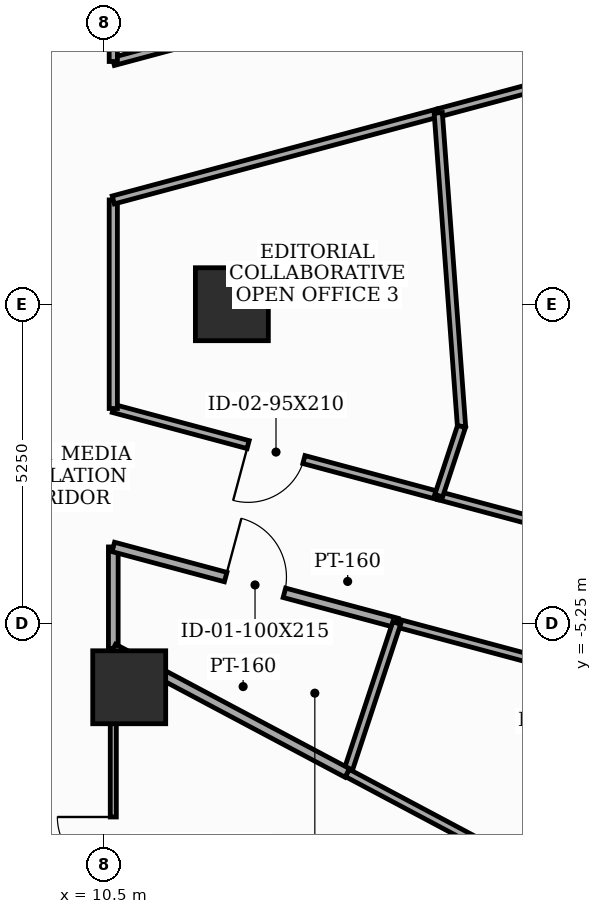
"""IFC4 building model, lengths in metres.
Left out: names, types, materials, properties, quantities, classifications, styles, units other than length and angle.
Written with IfcOpenShell. Run it as: python <this file> out.ifc"""

import sys

from ifc_helpers import new_model, si_unit, direction, frame, frame_2d, origin, origin_2d, place, context, subcontext, project, spatial, rectangle, extrude, element, fill, save


model = new_model("IFC4")
c1 = context("Model", 3, precision=1e-05, world=origin(), true_north=direction((0.0, 1.0)))
c2 = subcontext(c1, "Body", "Model", "MODEL_VIEW")
j1 = project(units=[si_unit("LENGTHUNIT", "METRE"), si_unit("PLANEANGLEUNIT", "RADIAN")], contexts=[c1])
p1 = place(None, origin())
s1 = spatial("IfcSite", under=j1, at=p1, CompositionType="ELEMENT")
p2 = place(p1, origin())
s2 = spatial("IfcBuilding", under=s1, at=p2, CompositionType="ELEMENT")
p3 = place(p2, frame((0.0, 0.0, 112.5)))
s3 = spatial("IfcBuildingStorey", under=s2, at=p3, CompositionType="ELEMENT", Elevation=112.5)
for number, where, z_axis, x_axis in (
    (1, (12.6, 0.0, 0.0), (0.0, 0.0, 1.0), (1.0, 0.0, 0.0)),
    (2, (10.912, -6.3, 0.0), (0.0, 0.0, 1.0), (1.0, 0.0, 0.0)),
):
    element("IfcColumn", number, at=place(p3, frame(where, z_axis=z_axis, x_axis=x_axis)), inside=s3, PredefinedType="COLUMN", context=c2, shape_type="SweptSolid", body=[
        extrude(rectangle(XDim=1.2, YDim=1.2, at=origin_2d()), origin(), (0.0, 0.0, 1.0), 3.7),
    ])
p4 = place(p3, frame((15.46, 5.281, 0.0), z_axis=(0.0, 0.0, 1.0), x_axis=(-0.96591522342, -0.258858612306, 0.0)))
e3 = element("IfcWall", 3, at=p4, inside=s3, PredefinedType="PARTITIONING", context=c2, shape_type="SweptSolid", body=[
    extrude(rectangle(XDim=4.98, YDim=0.135, at=frame_2d((2.49, 0.0))), origin(), (0.0, 0.0, 1.0), 2.785),
])
p5 = place(p3, frame((10.65, 3.992, 0.0), z_axis=(0.0, 0.0, 1.0), x_axis=(0.0, 1.0, 0.0)))
e4 = element("IfcWall", 4, at=p5, inside=s3, PredefinedType="PARTITIONING", context=c2, shape_type="SweptSolid", body=[
    extrude(rectangle(XDim=6.158, YDim=0.135, at=frame_2d((3.079, 0.0))), origin(), (0.0, 0.0, 1.0), 2.785),
])
p6 = place(p3, frame((15.312, -5.242, 0.0), z_axis=(0.0, 0.0, 1.0), x_axis=(0.965923394249, -0.258828121428, 0.0)))
e5 = element("IfcWall", 5, at=p6, inside=s3, PredefinedType="PARTITIONING", context=c2, shape_type="SweptSolid", body=[
    extrude(rectangle(XDim=6.453, YDim=0.135, at=frame_2d((3.227, 0.0))), origin(), (0.0, 0.0, 1.0), 2.935),
])
p7 = place(p6, frame((2.751, 0.0, 0.0)))
e6 = element("IfcOpeningElement", 6, at=p7, cuts=e5, PredefinedType="OPENING", context=c2, shape_type="SweptSolid", body=[
    extrude(rectangle(XDim=0.95, YDim=2.1, at=frame_2d((0.475, 1.05))), frame((0.0, 0.077, 0.0), z_axis=(0.0, -1.0, 0.0), x_axis=(1.0, 0.0, 0.0)), (0.0, 0.0, 1.0), 0.155),
])
p8 = place(p3, frame((22.115, -4.787, 0.0), z_axis=(0.0, 0.0, 1.0), x_axis=(-0.965917916001, 0.258848564894, 0.0)))
e7 = element("IfcWall", 7, at=p8, inside=s3, PredefinedType="PARTITIONING", context=c2, shape_type="SweptSolid", body=[
    extrude(rectangle(XDim=6.329, YDim=0.135, at=frame_2d((3.164, 0.0))), origin(), (0.0, 0.0, 1.0), 2.935),
])
p9 = place(p3, frame((15.994, 3.147, 0.0), z_axis=(0.0, 0.0, 1.0), x_axis=(0.965977255775, 0.258627031314, 0.0)))
e8 = element("IfcWall", 8, at=p9, inside=s3, PredefinedType="PARTITIONING", context=c2, shape_type="SweptSolid", body=[
    extrude(rectangle(XDim=2.536, YDim=0.135, at=frame_2d((1.268, 0.0))), origin(), (0.0, 0.0, 1.0), 3.125),
])
p10 = place(p3, frame((16.002, -3.149, 0.0), z_axis=(0.0, 0.0, 1.0), x_axis=(-0.965936644937, 0.258778665985, 0.0)))
e9 = element("IfcWall", 9, at=p10, inside=s3, PredefinedType="PARTITIONING", context=c2, shape_type="SweptSolid", body=[
    extrude(rectangle(XDim=5.541, YDim=0.135, at=frame_2d((2.771, 0.0))), origin(), (0.0, 0.0, 1.0), 2.785),
])
p11 = place(p10, frame((2.295, 0.0, 0.0)))
e10 = element("IfcOpeningElement", 10, at=p11, cuts=e9, PredefinedType="OPENING", context=c2, shape_type="SweptSolid", body=[
    extrude(rectangle(XDim=0.95, YDim=2.1, at=frame_2d((0.475, 1.05))), frame((0.0, 0.077, 0.0), z_axis=(0.0, -1.0, 0.0), x_axis=(1.0, 0.0, 0.0)), (0.0, 0.0, 1.0), 0.155),
])
p12 = place(p3, frame((10.65, -1.715, 0.0), z_axis=(0.0, 0.0, 1.0), x_axis=(0.0, 1.0, 0.0)))
e11 = element("IfcWall", 11, at=p12, inside=s3, PredefinedType="PARTITIONING", context=c2, shape_type="SweptSolid", body=[
    extrude(rectangle(XDim=3.43, YDim=0.135, at=frame_2d((1.715, 0.0))), origin(), (0.0, 0.0, 1.0), 2.785),
])
p13 = place(p3, frame((10.65, 1.715, 0.0), z_axis=(0.0, 0.0, 1.0), x_axis=(0.965927369368, 0.258813286187, 0.0)))
e12 = element("IfcWall", 12, at=p13, inside=s3, PredefinedType="PARTITIONING", context=c2, shape_type="SweptSolid", body=[
    extrude(rectangle(XDim=5.532, YDim=0.135, at=frame_2d((2.766, 0.0))), origin(), (0.0, 0.0, 1.0), 2.785),
])
p14 = place(p3, frame((10.65, -5.663, 0.0), z_axis=(0.0, 0.0, 1.0), x_axis=(0.0, 1.0, 0.0)))
e13 = element("IfcWall", 13, at=p14, inside=s3, PredefinedType="PARTITIONING", context=c2, shape_type="SweptSolid", body=[
    extrude(rectangle(XDim=1.671, YDim=0.16, at=frame_2d((0.835, 0.0))), origin(), (0.0, 0.0, 1.0), 3.5),
])
p15 = place(p3, frame((10.65, -3.992, 0.0), z_axis=(0.0, 0.0, 1.0), x_axis=(0.965884815894, -0.258972049507, 0.0)))
e14 = element("IfcWall", 14, at=p15, inside=s3, PredefinedType="PARTITIONING", context=c2, shape_type="SweptSolid", body=[
    extrude(rectangle(XDim=4.827, YDim=0.16, at=frame_2d((2.413, 0.0))), origin(), (0.0, 0.0, 1.0), 2.785),
])
p16 = place(p15, frame((1.913, 0.0, 0.0)))
e15 = element("IfcOpeningElement", 15, at=p16, cuts=e14, PredefinedType="OPENING", context=c2, shape_type="SweptSolid", body=[
    extrude(rectangle(XDim=1.0, YDim=2.15, at=frame_2d((0.5, 1.075))), frame((0.0, 0.09, 0.0), z_axis=(0.0, -1.0, 0.0), x_axis=(1.0, 0.0, 0.0)), (0.0, 0.0, 1.0), 0.18),
])
p17 = place(p3, frame((10.65, -10.15, 0.0), z_axis=(0.0, 0.0, 1.0), x_axis=(0.0, 1.0, 0.0)))
e16 = element("IfcWall", 16, at=p17, inside=s3, PredefinedType="MOVABLE", context=c2, shape_type="SweptSolid", body=[
    extrude(rectangle(XDim=4.487, YDim=0.1, at=frame_2d((2.243, 0.0))), origin(), (0.0, 0.0, 1.0), 2.785),
])
p18 = place(p17, frame((0.796, 0.0, 0.0)))
e17 = element("IfcOpeningElement", 17, at=p18, cuts=e16, PredefinedType="OPENING", context=c2, shape_type="SweptSolid", body=[
    extrude(rectangle(XDim=0.92, YDim=2.1, at=frame_2d((0.46, 1.05))), frame((0.0, 0.06, 0.0), z_axis=(0.0, -1.0, 0.0), x_axis=(1.0, 0.0, 0.0)), (0.0, 0.0, 1.0), 0.12),
])
p19 = place(p3, frame((15.994, 3.147, 0.0), z_axis=(0.0, 0.0, 1.0), x_axis=(0.074061203772, -0.99725369796, 0.0)))
e18 = element("IfcWall", 18, at=p19, inside=s3, PredefinedType="PARTITIONING", context=c2, shape_type="SweptSolid", body=[
    extrude(rectangle(XDim=5.172, YDim=0.135, at=frame_2d((2.586, 0.0))), origin(), (0.0, 0.0, 1.0), 2.785),
])
p20 = place(p3, frame((16.377, -2.011, 0.0), z_axis=(0.0, 0.0, 1.0), x_axis=(-0.312986027466, -0.949757730482, 0.0)))
e19 = element("IfcWall", 19, at=p20, inside=s3, PredefinedType="PARTITIONING", context=c2, shape_type="SweptSolid", body=[
    extrude(rectangle(XDim=1.198, YDim=0.135, at=frame_2d((0.599, 0.0))), origin(), (0.0, 0.0, 1.0), 3.5),
])
p21 = place(p3, frame((15.312, -5.242, 0.0), z_axis=(0.0, 0.0, 1.0), x_axis=(-0.313322366974, -0.949646826117, 0.0)))
e20 = element("IfcWall", 20, at=p21, inside=s3, PredefinedType="PARTITIONING", context=c2, shape_type="SweptSolid", body=[
    extrude(rectangle(XDim=2.598, YDim=0.135, at=frame_2d((1.299, 0.0))), origin(), (0.0, 0.0, 1.0), 3.5),
])
p22 = place(p3, frame((14.498, -7.709, 0.0), z_axis=(0.0, 0.0, 1.0), x_axis=(0.882923859613, -0.469516195808, 0.0)))
e21 = element("IfcWall", 21, at=p22, inside=s3, PredefinedType="PARTITIONING", context=c2, shape_type="SweptSolid", body=[
    extrude(rectangle(XDim=8.702, YDim=0.135, at=frame_2d((4.351, 0.0))), origin(), (0.0, 0.0, 1.0), 2.935),
])
p23 = place(p3, frame((10.65, -5.663, 0.0), z_axis=(0.0, 0.0, 1.0), x_axis=(0.882966263113, -0.469436447461, 0.0)))
e22 = element("IfcWall", 22, at=p23, inside=s3, PredefinedType="PARTITIONING", context=c2, shape_type="SweptSolid", body=[
    extrude(rectangle(XDim=4.358, YDim=0.16, at=frame_2d((2.179, 0.0))), origin(), (0.0, 0.0, 1.0), 2.785),
])
p24 = place(p11, origin())
e23 = element("IfcDoor", 23, at=p24, inside=s3, OperationType="SINGLE_SWING_RIGHT", PredefinedType="DOOR", context=c2, shape_type="SweptSolid", body=[
    extrude(rectangle(XDim=0.95, YDim=2.1, at=frame_2d((0.475, 1.05))), frame((0.0, 0.025, 0.0), z_axis=(0.0, -1.0, 0.0), x_axis=(1.0, 0.0, 0.0)), (0.0, 0.0, 1.0), 0.05),
])
fill(e10, e23)
p25 = place(p16, origin())
e24 = element("IfcDoor", 24, at=p25, inside=s3, OperationType="SINGLE_SWING_LEFT", PredefinedType="DOOR", context=c2, shape_type="SweptSolid", body=[
    extrude(rectangle(XDim=1.0, YDim=2.15, at=frame_2d((0.5, 1.075))), frame((0.0, 0.025, 0.0), z_axis=(0.0, -1.0, 0.0), x_axis=(1.0, 0.0, 0.0)), (0.0, 0.0, 1.0), 0.05),
])
fill(e15, e24)
p26 = place(p18, origin())
e25 = element("IfcDoor", 25, at=p26, inside=s3, OperationType="SINGLE_SWING_RIGHT", PredefinedType="DOOR", context=c2, shape_type="SweptSolid", body=[
    extrude(rectangle(XDim=0.92, YDim=2.1, at=frame_2d((0.46, 1.05))), frame((0.0, 0.025, 0.0), z_axis=(0.0, -1.0, 0.0), x_axis=(1.0, 0.0, 0.0)), (0.0, 0.0, 1.0), 0.05),
])
fill(e17, e25)
save(model, sys.argv[1])
